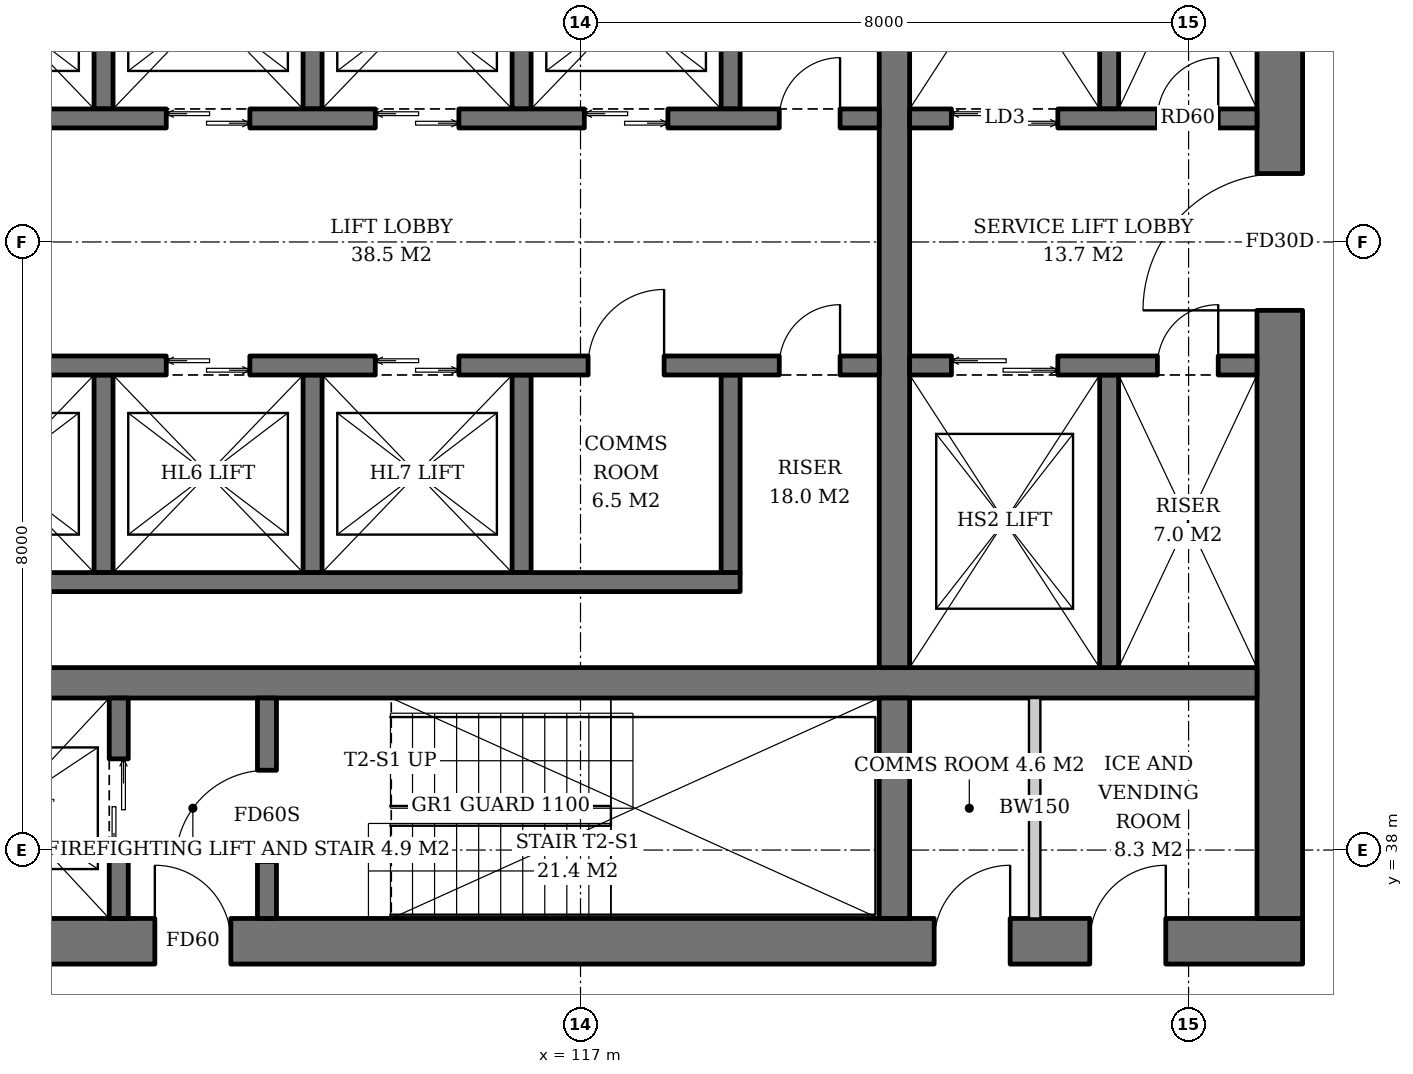
"""IFC4 building model, lengths in metres.
Left out: names, types, materials, properties, quantities, classifications, styles, units other than length and angle.
Written with IfcOpenShell. Run it as: python <this file> out.ifc"""

import sys

from ifc_helpers import new_model, si_unit, direction, frame, frame_2d, origin, place, context, subcontext, project, spatial, rectangle, extrude, element, fill, save


model = new_model("IFC4")
c1 = context("Model", 3, precision=1e-05, world=origin(), true_north=direction((0.0, 1.0)))
c2 = subcontext(c1, "Body", "Model", "MODEL_VIEW")
j1 = project(units=[si_unit("LENGTHUNIT", "METRE"), si_unit("PLANEANGLEUNIT", "RADIAN")], contexts=[c1])
p1 = place(None, origin())
s1 = spatial("IfcSite", under=j1, at=p1, CompositionType="ELEMENT")
p2 = place(p1, origin())
s2 = spatial("IfcBuilding", under=s1, at=p2, CompositionType="ELEMENT")
p3 = place(p2, frame((0.0, 0.0, 36.2)))
s3 = spatial("IfcBuildingStorey", under=s2, at=p3, CompositionType="ELEMENT", Elevation=36.2)
p4 = place(p3, frame((107.5, 36.8, 0.0), z_axis=(0.0, 0.0, 1.0), x_axis=(1.0, 0.0, 0.0)))
e1 = element("IfcWall", 1, at=p4, inside=s3, PredefinedType="SHEAR", context=c2, shape_type="SweptSolid", body=[
    extrude(rectangle(XDim=19.0, YDim=0.6, at=frame_2d((9.5, 0.0))), origin(), (0.0, 0.0, 1.0), 3.8),
])
p5 = place(p4, frame((3.9, 0.0, 0.0)))
e2 = element("IfcOpeningElement", 2, at=p5, cuts=e1, PredefinedType="OPENING", context=c2, shape_type="SweptSolid", body=[
    extrude(rectangle(XDim=1.0, YDim=2.1, at=frame_2d((0.5, 1.05))), frame((0.0, 0.31, 0.0), z_axis=(0.0, -1.0, 0.0), x_axis=(1.0, 0.0, 0.0)), (0.0, 0.0, 1.0), 0.62),
])
p6 = place(p4, frame((14.153, 0.0, 0.0)))
e3 = element("IfcOpeningElement", 3, at=p6, cuts=e1, PredefinedType="OPENING", context=c2, shape_type="SweptSolid", body=[
    extrude(rectangle(XDim=1.0, YDim=2.1, at=frame_2d((0.5, 1.05))), frame((0.0, 0.31, 0.0), z_axis=(0.0, -1.0, 0.0), x_axis=(1.0, 0.0, 0.0)), (0.0, 0.0, 1.0), 0.62),
])
p7 = place(p4, frame((16.2, 0.0, 0.0)))
e4 = element("IfcOpeningElement", 4, at=p7, cuts=e1, PredefinedType="OPENING", context=c2, shape_type="SweptSolid", body=[
    extrude(rectangle(XDim=1.0, YDim=2.1, at=frame_2d((0.5, 1.05))), frame((0.0, 0.31, 0.0), z_axis=(0.0, -1.0, 0.0), x_axis=(1.0, 0.0, 0.0)), (0.0, 0.0, 1.0), 0.62),
])
p8 = place(p3, frame((126.2, 37.1, 0.0), z_axis=(0.0, 0.0, 1.0), x_axis=(0.0, 1.0, 0.0)))
e5 = element("IfcWall", 5, at=p8, inside=s3, PredefinedType="SHEAR", context=c2, shape_type="SweptSolid", body=[
    extrude(rectangle(XDim=17.8, YDim=0.6, at=frame_2d((8.9, 0.0))), origin(), (0.0, 0.0, 1.0), 3.8),
])
p9 = place(p8, frame((8.0, 0.0, 0.0)))
e6 = element("IfcOpeningElement", 6, at=p9, cuts=e5, PredefinedType="OPENING", context=c2, shape_type="SweptSolid", body=[
    extrude(rectangle(XDim=1.8, YDim=2.4, at=frame_2d((0.9, 1.2))), frame((0.0, 0.31, 0.0), z_axis=(0.0, -1.0, 0.0), x_axis=(1.0, 0.0, 0.0)), (0.0, 0.0, 1.0), 0.62),
])
p10 = place(p3, frame((108.1, 40.2, 0.0), z_axis=(0.0, 0.0, 1.0), x_axis=(1.0, 0.0, 0.0)))
e7 = element("IfcWall", 7, at=p10, inside=s3, PredefinedType="SHEAR", context=c2, shape_type="SweptSolid", body=[
    extrude(rectangle(XDim=17.8, YDim=0.4, at=frame_2d((8.9, 0.0))), origin(), (0.0, 0.0, 1.0), 3.8),
])
p11 = place(p3, frame((121.13, 37.1, 0.0), z_axis=(0.0, 0.0, 1.0), x_axis=(0.0, 1.0, 0.0)))
e8 = element("IfcWall", 8, at=p11, inside=s3, PredefinedType="SHEAR", context=c2, shape_type="SweptSolid", body=[
    extrude(rectangle(XDim=2.9, YDim=0.4, at=frame_2d((1.45, 0.0))), origin(), (0.0, 0.0, 1.0), 3.8),
])
p12 = place(p3, frame((121.13, 40.4, 0.0), z_axis=(0.0, 0.0, 1.0), x_axis=(0.0, 1.0, 0.0)))
e9 = element("IfcWall", 9, at=p12, inside=s3, PredefinedType="SHEAR", context=c2, shape_type="SweptSolid", body=[
    extrude(rectangle(XDim=11.2, YDim=0.4, at=frame_2d((5.6, 0.0))), origin(), (0.0, 0.0, 1.0), 3.8),
])
p13 = place(p3, frame((110.925, 37.1, 0.0), z_axis=(0.0, 0.0, 1.0), x_axis=(0.0, 1.0, 0.0)))
e10 = element("IfcWall", 10, at=p13, inside=s3, PredefinedType="SHEAR", context=c2, shape_type="SweptSolid", body=[
    extrude(rectangle(XDim=2.9, YDim=0.25, at=frame_2d((1.45, 0.0))), origin(), (0.0, 0.0, 1.0), 3.8),
])
p14 = place(p13, frame((0.8, 0.0, 0.0)))
e11 = element("IfcOpeningElement", 11, at=p14, cuts=e10, PredefinedType="OPENING", context=c2, shape_type="SweptSolid", body=[
    extrude(rectangle(XDim=1.3, YDim=2.2, at=frame_2d((0.65, 1.1))), frame((0.0, 0.135, 0.0), z_axis=(0.0, -1.0, 0.0), x_axis=(1.0, 0.0, 0.0)), (0.0, 0.0, 1.0), 0.27),
])
p15 = place(p3, frame((112.875, 37.1, 0.0), z_axis=(0.0, 0.0, 1.0), x_axis=(0.0, 1.0, 0.0)))
e12 = element("IfcWall", 12, at=p15, inside=s3, PredefinedType="SHEAR", context=c2, shape_type="SweptSolid", body=[
    extrude(rectangle(XDim=2.9, YDim=0.25, at=frame_2d((1.45, 0.0))), origin(), (0.0, 0.0, 1.0), 3.8),
])
p16 = place(p15, frame((0.75, 0.0, 0.0)))
e13 = element("IfcOpeningElement", 13, at=p16, cuts=e12, PredefinedType="OPENING", context=c2, shape_type="SweptSolid", body=[
    extrude(rectangle(XDim=1.2, YDim=2.1, at=frame_2d((0.6, 1.05))), frame((0.0, 0.135, 0.0), z_axis=(0.0, -1.0, 0.0), x_axis=(1.0, 0.0, 0.0)), (0.0, 0.0, 1.0), 0.27),
])
for number, where, z_axis, x_axis in (
    (14, (110.725, 47.75, 0.0), (0.0, 0.0, 1.0), (0.0, 1.0, 0.0)),
    (15, (113.475, 47.75, 0.0), (0.0, 0.0, 1.0), (0.0, 1.0, 0.0)),
    (16, (116.225, 47.75, 0.0), (0.0, 0.0, 1.0), (0.0, 1.0, 0.0)),
    (17, (118.975, 47.75, 0.0), (0.0, 0.0, 1.0), (0.0, 1.0, 0.0)),
):
    element("IfcWall", number, at=place(p3, frame(where, z_axis=z_axis, x_axis=x_axis)), inside=s3, PredefinedType="SHEAR", context=c2, shape_type="SweptSolid", body=[
        extrude(rectangle(XDim=2.6, YDim=0.25, at=frame_2d((1.3, 0.0))), origin(), (0.0, 0.0, 1.0), 3.8),
    ])
p17 = place(p3, frame((108.1, 47.625, 0.0), z_axis=(0.0, 0.0, 1.0), x_axis=(1.0, 0.0, 0.0)))
e18 = element("IfcWall", 18, at=p17, inside=s3, PredefinedType="SHEAR", context=c2, shape_type="SweptSolid", body=[
    extrude(rectangle(XDim=12.83, YDim=0.25, at=frame_2d((6.415, 0.0))), origin(), (0.0, 0.0, 1.0), 3.8),
])
p18 = place(p17, frame((0.7, 0.0, 0.0)))
e19 = element("IfcOpeningElement", 19, at=p18, cuts=e18, PredefinedType="OPENING", context=c2, shape_type="SweptSolid", body=[
    extrude(rectangle(XDim=1.1, YDim=2.2, at=frame_2d((0.55, 1.1))), frame((0.0, 0.135, 0.0), z_axis=(0.0, -1.0, 0.0), x_axis=(1.0, 0.0, 0.0)), (0.0, 0.0, 1.0), 0.27),
])
p19 = place(p17, frame((3.45, 0.0, 0.0)))
e20 = element("IfcOpeningElement", 20, at=p19, cuts=e18, PredefinedType="OPENING", context=c2, shape_type="SweptSolid", body=[
    extrude(rectangle(XDim=1.1, YDim=2.2, at=frame_2d((0.55, 1.1))), frame((0.0, 0.135, 0.0), z_axis=(0.0, -1.0, 0.0), x_axis=(1.0, 0.0, 0.0)), (0.0, 0.0, 1.0), 0.27),
])
p20 = place(p17, frame((6.2, 0.0, 0.0)))
e21 = element("IfcOpeningElement", 21, at=p20, cuts=e18, PredefinedType="OPENING", context=c2, shape_type="SweptSolid", body=[
    extrude(rectangle(XDim=1.1, YDim=2.2, at=frame_2d((0.55, 1.1))), frame((0.0, 0.135, 0.0), z_axis=(0.0, -1.0, 0.0), x_axis=(1.0, 0.0, 0.0)), (0.0, 0.0, 1.0), 0.27),
])
p21 = place(p17, frame((8.95, 0.0, 0.0)))
e22 = element("IfcOpeningElement", 22, at=p21, cuts=e18, PredefinedType="OPENING", context=c2, shape_type="SweptSolid", body=[
    extrude(rectangle(XDim=1.1, YDim=2.2, at=frame_2d((0.55, 1.1))), frame((0.0, 0.135, 0.0), z_axis=(0.0, -1.0, 0.0), x_axis=(1.0, 0.0, 0.0)), (0.0, 0.0, 1.0), 0.27),
])
p22 = place(p17, frame((11.515, 0.0, 0.0)))
e23 = element("IfcOpeningElement", 23, at=p22, cuts=e18, PredefinedType="OPENING", context=c2, shape_type="SweptSolid", body=[
    extrude(rectangle(XDim=0.8, YDim=2.0, at=frame_2d((0.4, 1.0))), frame((0.0, 0.135, 0.0), z_axis=(0.0, -1.0, 0.0), x_axis=(1.0, 0.0, 0.0)), (0.0, 0.0, 1.0), 0.27),
])
for number, where, z_axis, x_axis in (
    (24, (110.725, 44.25, 0.0), (0.0, 0.0, 1.0), (0.0, -1.0, 0.0)),
    (25, (113.475, 44.25, 0.0), (0.0, 0.0, 1.0), (0.0, -1.0, 0.0)),
    (26, (116.225, 44.25, 0.0), (0.0, 0.0, 1.0), (0.0, -1.0, 0.0)),
    (27, (118.975, 44.25, 0.0), (0.0, 0.0, 1.0), (0.0, -1.0, 0.0)),
):
    element("IfcWall", number, at=place(p3, frame(where, z_axis=z_axis, x_axis=x_axis)), inside=s3, PredefinedType="SHEAR", context=c2, shape_type="SweptSolid", body=[
        extrude(rectangle(XDim=2.6, YDim=0.25, at=frame_2d((1.3, 0.0))), origin(), (0.0, 0.0, 1.0), 3.8),
    ])
p23 = place(p3, frame((108.1, 41.525, 0.0), z_axis=(0.0, 0.0, 1.0), x_axis=(1.0, 0.0, 0.0)))
e28 = element("IfcWall", 28, at=p23, inside=s3, PredefinedType="SHEAR", context=c2, shape_type="SweptSolid", body=[
    extrude(rectangle(XDim=11.0, YDim=0.25, at=frame_2d((5.5, 0.0))), origin(), (0.0, 0.0, 1.0), 3.8),
])
p24 = place(p3, frame((108.1, 44.375, 0.0), z_axis=(0.0, 0.0, 1.0), x_axis=(1.0, 0.0, 0.0)))
e29 = element("IfcWall", 29, at=p24, inside=s3, PredefinedType="SHEAR", context=c2, shape_type="SweptSolid", body=[
    extrude(rectangle(XDim=12.83, YDim=0.25, at=frame_2d((6.415, 0.0))), origin(), (0.0, 0.0, 1.0), 3.8),
])
p25 = place(p24, frame((0.7, 0.0, 0.0)))
e30 = element("IfcOpeningElement", 30, at=p25, cuts=e29, PredefinedType="OPENING", context=c2, shape_type="SweptSolid", body=[
    extrude(rectangle(XDim=1.1, YDim=2.2, at=frame_2d((0.55, 1.1))), frame((0.0, 0.135, 0.0), z_axis=(0.0, -1.0, 0.0), x_axis=(1.0, 0.0, 0.0)), (0.0, 0.0, 1.0), 0.27),
])
p26 = place(p24, frame((3.45, 0.0, 0.0)))
e31 = element("IfcOpeningElement", 31, at=p26, cuts=e29, PredefinedType="OPENING", context=c2, shape_type="SweptSolid", body=[
    extrude(rectangle(XDim=1.1, YDim=2.2, at=frame_2d((0.55, 1.1))), frame((0.0, 0.135, 0.0), z_axis=(0.0, -1.0, 0.0), x_axis=(1.0, 0.0, 0.0)), (0.0, 0.0, 1.0), 0.27),
])
p27 = place(p24, frame((6.2, 0.0, 0.0)))
e32 = element("IfcOpeningElement", 32, at=p27, cuts=e29, PredefinedType="OPENING", context=c2, shape_type="SweptSolid", body=[
    extrude(rectangle(XDim=1.1, YDim=2.2, at=frame_2d((0.55, 1.1))), frame((0.0, 0.135, 0.0), z_axis=(0.0, -1.0, 0.0), x_axis=(1.0, 0.0, 0.0)), (0.0, 0.0, 1.0), 0.27),
])
p28 = place(p24, frame((9.0, 0.0, 0.0)))
e33 = element("IfcOpeningElement", 33, at=p28, cuts=e29, PredefinedType="OPENING", context=c2, shape_type="SweptSolid", body=[
    extrude(rectangle(XDim=1.0, YDim=2.1, at=frame_2d((0.5, 1.05))), frame((0.0, 0.135, 0.0), z_axis=(0.0, -1.0, 0.0), x_axis=(1.0, 0.0, 0.0)), (0.0, 0.0, 1.0), 0.27),
])
p29 = place(p24, frame((11.515, 0.0, 0.0)))
e34 = element("IfcOpeningElement", 34, at=p29, cuts=e29, PredefinedType="OPENING", context=c2, shape_type="SweptSolid", body=[
    extrude(rectangle(XDim=0.8, YDim=2.0, at=frame_2d((0.4, 1.0))), frame((0.0, 0.135, 0.0), z_axis=(0.0, -1.0, 0.0), x_axis=(1.0, 0.0, 0.0)), (0.0, 0.0, 1.0), 0.27),
])
p30 = place(p3, frame((123.955, 47.75, 0.0), z_axis=(0.0, 0.0, 1.0), x_axis=(0.0, 1.0, 0.0)))
e35 = element("IfcWall", 35, at=p30, inside=s3, PredefinedType="SHEAR", context=c2, shape_type="SweptSolid", body=[
    extrude(rectangle(XDim=3.85, YDim=0.25, at=frame_2d((1.925, 0.0))), origin(), (0.0, 0.0, 1.0), 3.8),
])
p31 = place(p3, frame((121.33, 47.625, 0.0), z_axis=(0.0, 0.0, 1.0), x_axis=(1.0, 0.0, 0.0)))
e36 = element("IfcWall", 36, at=p31, inside=s3, PredefinedType="SHEAR", context=c2, shape_type="SweptSolid", body=[
    extrude(rectangle(XDim=4.57, YDim=0.25, at=frame_2d((2.285, 0.0))), origin(), (0.0, 0.0, 1.0), 3.8),
])
p32 = place(p31, frame((0.55, 0.0, 0.0)))
e37 = element("IfcOpeningElement", 37, at=p32, cuts=e36, PredefinedType="OPENING", context=c2, shape_type="SweptSolid", body=[
    extrude(rectangle(XDim=1.4, YDim=2.4, at=frame_2d((0.7, 1.2))), frame((0.0, 0.135, 0.0), z_axis=(0.0, -1.0, 0.0), x_axis=(1.0, 0.0, 0.0)), (0.0, 0.0, 1.0), 0.27),
])
p33 = place(p31, frame((3.26, 0.0, 0.0)))
e38 = element("IfcOpeningElement", 38, at=p33, cuts=e36, PredefinedType="OPENING", context=c2, shape_type="SweptSolid", body=[
    extrude(rectangle(XDim=0.8, YDim=2.0, at=frame_2d((0.4, 1.0))), frame((0.0, 0.135, 0.0), z_axis=(0.0, -1.0, 0.0), x_axis=(1.0, 0.0, 0.0)), (0.0, 0.0, 1.0), 0.27),
])
p34 = place(p3, frame((123.955, 44.25, 0.0), z_axis=(0.0, 0.0, 1.0), x_axis=(0.0, -1.0, 0.0)))
e39 = element("IfcWall", 39, at=p34, inside=s3, PredefinedType="SHEAR", context=c2, shape_type="SweptSolid", body=[
    extrude(rectangle(XDim=3.85, YDim=0.25, at=frame_2d((1.925, 0.0))), origin(), (0.0, 0.0, 1.0), 3.8),
])
p35 = place(p3, frame((121.33, 44.375, 0.0), z_axis=(0.0, 0.0, 1.0), x_axis=(1.0, 0.0, 0.0)))
e40 = element("IfcWall", 40, at=p35, inside=s3, PredefinedType="SHEAR", context=c2, shape_type="SweptSolid", body=[
    extrude(rectangle(XDim=4.57, YDim=0.25, at=frame_2d((2.285, 0.0))), origin(), (0.0, 0.0, 1.0), 3.8),
])
p36 = place(p35, frame((0.55, 0.0, 0.0)))
e41 = element("IfcOpeningElement", 41, at=p36, cuts=e40, PredefinedType="OPENING", context=c2, shape_type="SweptSolid", body=[
    extrude(rectangle(XDim=1.4, YDim=2.4, at=frame_2d((0.7, 1.2))), frame((0.0, 0.135, 0.0), z_axis=(0.0, -1.0, 0.0), x_axis=(1.0, 0.0, 0.0)), (0.0, 0.0, 1.0), 0.27),
])
p37 = place(p35, frame((3.26, 0.0, 0.0)))
e42 = element("IfcOpeningElement", 42, at=p37, cuts=e40, PredefinedType="OPENING", context=c2, shape_type="SweptSolid", body=[
    extrude(rectangle(XDim=0.8, YDim=2.0, at=frame_2d((0.4, 1.0))), frame((0.0, 0.135, 0.0), z_axis=(0.0, -1.0, 0.0), x_axis=(1.0, 0.0, 0.0)), (0.0, 0.0, 1.0), 0.27),
])
p38 = place(p3, frame((122.975, 37.1, 0.0), z_axis=(0.0, 0.0, 1.0), x_axis=(0.0, 1.0, 0.0)))
e43 = element("IfcWall", 43, at=p38, inside=s3, PredefinedType="SOLIDWALL", context=c2, shape_type="SweptSolid", body=[
    extrude(rectangle(XDim=2.9, YDim=0.15, at=frame_2d((1.45, 0.0))), origin(), (0.0, 0.0, 1.0), 3.6),
])
p39 = place(p14, origin())
e44 = element("IfcDoor", 44, at=p39, inside=s3, OperationType="DOUBLE_DOOR_SLIDING", PredefinedType="DOOR", context=c2, shape_type="SweptSolid", body=[
    extrude(rectangle(XDim=1.3, YDim=2.2, at=frame_2d((0.65, 1.1))), frame((0.0, 0.025, 0.0), z_axis=(0.0, -1.0, 0.0), x_axis=(1.0, 0.0, 0.0)), (0.0, 0.0, 1.0), 0.05),
])
fill(e11, e44)
p40 = place(p16, origin())
e45 = element("IfcDoor", 45, at=p40, inside=s3, OperationType="SINGLE_SWING_LEFT", PredefinedType="DOOR", context=c2, shape_type="SweptSolid", body=[
    extrude(rectangle(XDim=1.2, YDim=2.1, at=frame_2d((0.6, 1.05))), frame((0.0, 0.025, 0.0), z_axis=(0.0, -1.0, 0.0), x_axis=(1.0, 0.0, 0.0)), (0.0, 0.0, 1.0), 0.05),
])
fill(e13, e45)
p41 = place(p19, origin())
e46 = element("IfcDoor", 46, at=p41, inside=s3, OperationType="DOUBLE_DOOR_SLIDING", PredefinedType="DOOR", context=c2, shape_type="SweptSolid", body=[
    extrude(rectangle(XDim=1.1, YDim=2.2, at=frame_2d((0.55, 1.1))), frame((0.0, 0.025, 0.0), z_axis=(0.0, -1.0, 0.0), x_axis=(1.0, 0.0, 0.0)), (0.0, 0.0, 1.0), 0.05),
])
fill(e20, e46)
p42 = place(p20, origin())
e47 = element("IfcDoor", 47, at=p42, inside=s3, OperationType="DOUBLE_DOOR_SLIDING", PredefinedType="DOOR", context=c2, shape_type="SweptSolid", body=[
    extrude(rectangle(XDim=1.1, YDim=2.2, at=frame_2d((0.55, 1.1))), frame((0.0, 0.025, 0.0), z_axis=(0.0, -1.0, 0.0), x_axis=(1.0, 0.0, 0.0)), (0.0, 0.0, 1.0), 0.05),
])
fill(e21, e47)
p43 = place(p21, origin())
e48 = element("IfcDoor", 48, at=p43, inside=s3, OperationType="DOUBLE_DOOR_SLIDING", PredefinedType="DOOR", context=c2, shape_type="SweptSolid", body=[
    extrude(rectangle(XDim=1.1, YDim=2.2, at=frame_2d((0.55, 1.1))), frame((0.0, 0.025, 0.0), z_axis=(0.0, -1.0, 0.0), x_axis=(1.0, 0.0, 0.0)), (0.0, 0.0, 1.0), 0.05),
])
fill(e22, e48)
p44 = place(p22, origin())
e49 = element("IfcDoor", 49, at=p44, inside=s3, OperationType="SINGLE_SWING_RIGHT", PredefinedType="DOOR", context=c2, shape_type="SweptSolid", body=[
    extrude(rectangle(XDim=0.8, YDim=2.0, at=frame_2d((0.4, 1.0))), frame((0.0, 0.025, 0.0), z_axis=(0.0, -1.0, 0.0), x_axis=(1.0, 0.0, 0.0)), (0.0, 0.0, 1.0), 0.05),
])
fill(e23, e49)
p45 = place(p26, origin())
e50 = element("IfcDoor", 50, at=p45, inside=s3, OperationType="DOUBLE_DOOR_SLIDING", PredefinedType="DOOR", context=c2, shape_type="SweptSolid", body=[
    extrude(rectangle(XDim=1.1, YDim=2.2, at=frame_2d((0.55, 1.1))), frame((0.0, 0.025, 0.0), z_axis=(0.0, -1.0, 0.0), x_axis=(1.0, 0.0, 0.0)), (0.0, 0.0, 1.0), 0.05),
])
fill(e31, e50)
p46 = place(p27, origin())
e51 = element("IfcDoor", 51, at=p46, inside=s3, OperationType="DOUBLE_DOOR_SLIDING", PredefinedType="DOOR", context=c2, shape_type="SweptSolid", body=[
    extrude(rectangle(XDim=1.1, YDim=2.2, at=frame_2d((0.55, 1.1))), frame((0.0, 0.025, 0.0), z_axis=(0.0, -1.0, 0.0), x_axis=(1.0, 0.0, 0.0)), (0.0, 0.0, 1.0), 0.05),
])
fill(e32, e51)
p47 = place(p28, origin())
e52 = element("IfcDoor", 52, at=p47, inside=s3, OperationType="SINGLE_SWING_RIGHT", PredefinedType="DOOR", context=c2, shape_type="SweptSolid", body=[
    extrude(rectangle(XDim=1.0, YDim=2.1, at=frame_2d((0.5, 1.05))), frame((0.0, 0.025, 0.0), z_axis=(0.0, -1.0, 0.0), x_axis=(1.0, 0.0, 0.0)), (0.0, 0.0, 1.0), 0.05),
])
fill(e33, e52)
p48 = place(p29, origin())
e53 = element("IfcDoor", 53, at=p48, inside=s3, OperationType="SINGLE_SWING_RIGHT", PredefinedType="DOOR", context=c2, shape_type="SweptSolid", body=[
    extrude(rectangle(XDim=0.8, YDim=2.0, at=frame_2d((0.4, 1.0))), frame((0.0, 0.025, 0.0), z_axis=(0.0, -1.0, 0.0), x_axis=(1.0, 0.0, 0.0)), (0.0, 0.0, 1.0), 0.05),
])
fill(e34, e53)
p49 = place(p32, origin())
e54 = element("IfcDoor", 54, at=p49, inside=s3, OperationType="DOUBLE_DOOR_SLIDING", PredefinedType="DOOR", context=c2, shape_type="SweptSolid", body=[
    extrude(rectangle(XDim=1.4, YDim=2.4, at=frame_2d((0.7, 1.2))), frame((0.0, 0.025, 0.0), z_axis=(0.0, -1.0, 0.0), x_axis=(1.0, 0.0, 0.0)), (0.0, 0.0, 1.0), 0.05),
])
fill(e37, e54)
p50 = place(p33, origin())
e55 = element("IfcDoor", 55, at=p50, inside=s3, OperationType="SINGLE_SWING_RIGHT", PredefinedType="DOOR", context=c2, shape_type="SweptSolid", body=[
    extrude(rectangle(XDim=0.8, YDim=2.0, at=frame_2d((0.4, 1.0))), frame((0.0, 0.025, 0.0), z_axis=(0.0, -1.0, 0.0), x_axis=(1.0, 0.0, 0.0)), (0.0, 0.0, 1.0), 0.05),
])
fill(e38, e55)
p51 = place(p36, origin())
e56 = element("IfcDoor", 56, at=p51, inside=s3, OperationType="DOUBLE_DOOR_SLIDING", PredefinedType="DOOR", context=c2, shape_type="SweptSolid", body=[
    extrude(rectangle(XDim=1.4, YDim=2.4, at=frame_2d((0.7, 1.2))), frame((0.0, 0.025, 0.0), z_axis=(0.0, -1.0, 0.0), x_axis=(1.0, 0.0, 0.0)), (0.0, 0.0, 1.0), 0.05),
])
fill(e41, e56)
p52 = place(p37, origin())
e57 = element("IfcDoor", 57, at=p52, inside=s3, OperationType="SINGLE_SWING_RIGHT", PredefinedType="DOOR", context=c2, shape_type="SweptSolid", body=[
    extrude(rectangle(XDim=0.8, YDim=2.0, at=frame_2d((0.4, 1.0))), frame((0.0, 0.025, 0.0), z_axis=(0.0, -1.0, 0.0), x_axis=(1.0, 0.0, 0.0)), (0.0, 0.0, 1.0), 0.05),
])
fill(e42, e57)
p53 = place(p5, origin())
e58 = element("IfcDoor", 58, at=p53, inside=s3, OperationType="SINGLE_SWING_LEFT", PredefinedType="DOOR", context=c2, shape_type="SweptSolid", body=[
    extrude(rectangle(XDim=1.0, YDim=2.1, at=frame_2d((0.5, 1.05))), frame((0.0, 0.025, 0.0), z_axis=(0.0, -1.0, 0.0), x_axis=(1.0, 0.0, 0.0)), (0.0, 0.0, 1.0), 0.05),
])
fill(e2, e58)
p54 = place(p9, origin())
e59 = element("IfcDoor", 59, at=p54, inside=s3, OperationType="DOUBLE_DOOR_SINGLE_SWING", PredefinedType="DOOR", context=c2, shape_type="SweptSolid", body=[
    extrude(rectangle(XDim=1.8, YDim=2.4, at=frame_2d((0.9, 1.2))), frame((0.0, 0.025, 0.0), z_axis=(0.0, -1.0, 0.0), x_axis=(1.0, 0.0, 0.0)), (0.0, 0.0, 1.0), 0.05),
])
fill(e6, e59)
p55 = place(p6, origin())
e60 = element("IfcDoor", 60, at=p55, inside=s3, OperationType="SINGLE_SWING_RIGHT", PredefinedType="DOOR", context=c2, shape_type="SweptSolid", body=[
    extrude(rectangle(XDim=1.0, YDim=2.1, at=frame_2d((0.5, 1.05))), frame((0.0, 0.29, 0.0), z_axis=(0.0, -1.0, 0.0), x_axis=(1.0, 0.0, 0.0)), (0.0, 0.0, 1.0), 0.05),
])
fill(e3, e60)
p56 = place(p7, origin())
e61 = element("IfcDoor", 61, at=p56, inside=s3, OperationType="SINGLE_SWING_RIGHT", PredefinedType="DOOR", context=c2, shape_type="SweptSolid", body=[
    extrude(rectangle(XDim=1.0, YDim=2.1, at=frame_2d((0.5, 1.05))), frame((0.0, 0.29, 0.0), z_axis=(0.0, -1.0, 0.0), x_axis=(1.0, 0.0, 0.0)), (0.0, 0.0, 1.0), 0.05),
])
fill(e4, e61)
save(model, sys.argv[1])
